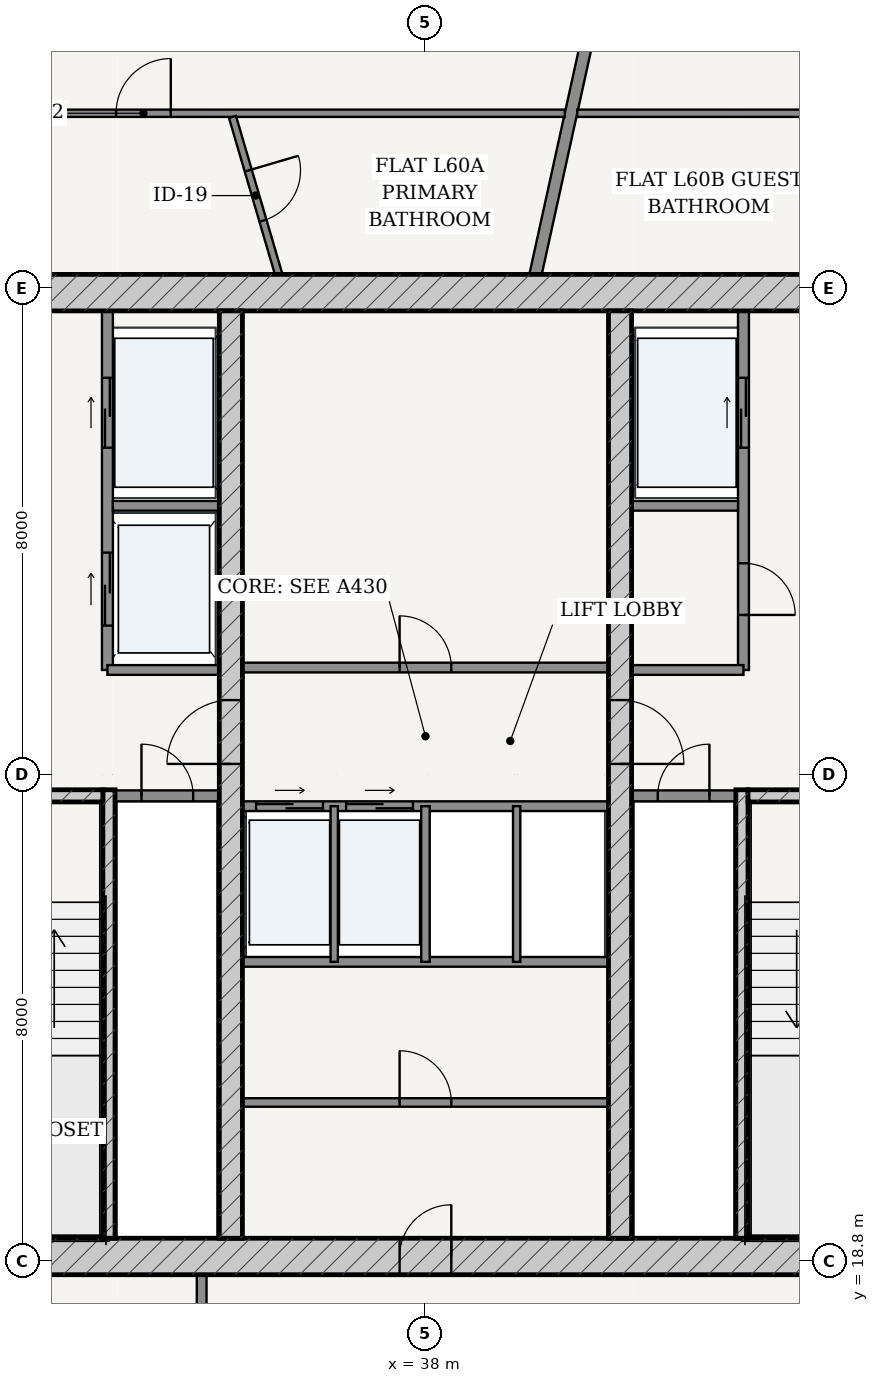
"""IFC4 building model, lengths in metres.
Left out: names, types, materials, properties, quantities, classifications, styles, units other than length and angle.
Written with IfcOpenShell. Run it as: python <this file> out.ifc"""

import sys

from ifc_helpers import new_model, si_unit, direction, frame, frame_2d, origin, place, context, subcontext, project, spatial, rectangle, extrude, source, transform, mapped, element, fill, save


model = new_model("IFC4")
c1 = context("Model", 3, precision=1e-05, world=origin(), true_north=direction((-0.2419218956, 0.970295726276)))
c2 = subcontext(c1, "Body", "Model", "MODEL_VIEW")
j1 = project(units=[si_unit("LENGTHUNIT", "METRE"), si_unit("PLANEANGLEUNIT", "RADIAN")], contexts=[c1])
p1 = place(None, origin())
s1 = spatial("IfcSite", under=j1, at=p1, CompositionType="ELEMENT")
p2 = place(p1, origin())
s2 = spatial("IfcBuilding", under=s1, at=p2, CompositionType="ELEMENT")
p3 = place(p2, frame((0.0, 0.0, 228.2)))
s3 = spatial("IfcBuildingStorey", under=s2, at=p3, CompositionType="ELEMENT", Elevation=228.2)
p4 = place(p3, frame((28.775, 18.875, 0.0), z_axis=(0.0, 0.0, 1.0), x_axis=(1.0, 0.0, 0.0)))
e1 = element("IfcWall", 1, at=p4, inside=s3, PredefinedType="SHEAR", context=c2, shape_type="SweptSolid", body=[
    extrude(rectangle(XDim=18.45, YDim=0.6, at=frame_2d((9.225, 0.0))), origin(), (0.0, 0.0, 1.0), 3.435),
])
p5 = place(p4, frame((8.8, 0.0, 0.0)))
e2 = element("IfcOpeningElement", 2, at=p5, cuts=e1, PredefinedType="OPENING", context=c2, shape_type="SweptSolid", body=[
    extrude(rectangle(XDim=0.85, YDim=2.1, at=frame_2d((0.425, 1.05))), frame((0.0, 0.31, 0.0), z_axis=(0.0, -1.0, 0.0), x_axis=(1.0, 0.0, 0.0)), (0.0, 0.0, 1.0), 0.62),
])
p6 = place(p3, frame((28.775, 34.725, 0.0), z_axis=(0.0, 0.0, 1.0), x_axis=(1.0, 0.0, 0.0)))
e3 = element("IfcWall", 3, at=p6, inside=s3, PredefinedType="SHEAR", context=c2, shape_type="SweptSolid", body=[
    extrude(rectangle(XDim=18.45, YDim=0.6, at=frame_2d((9.225, 0.0))), origin(), (0.0, 0.0, 1.0), 3.435),
])
p7 = place(p3, frame((32.795, 19.175, 0.0), z_axis=(0.0, 0.0, 1.0), x_axis=(0.0, 1.0, 0.0)))
e4 = element("IfcWall", 4, at=p7, inside=s3, PredefinedType="SOLIDWALL", context=c2, shape_type="SweptSolid", body=[
    extrude(rectangle(XDim=7.375, YDim=0.2, at=frame_2d((3.688, 0.0))), origin(), (0.0, 0.0, 1.0), 3.435),
])
p8 = place(p3, frame((29.375, 26.45, 0.0), z_axis=(0.0, 0.0, 1.0), x_axis=(1.0, 0.0, 0.0)))
e5 = element("IfcWall", 5, at=p8, inside=s3, PredefinedType="SOLIDWALL", context=c2, shape_type="SweptSolid", body=[
    extrude(rectangle(XDim=3.32, YDim=0.2, at=frame_2d((1.66, 0.0))), origin(), (0.0, 0.0, 1.0), 3.435),
])
p9 = place(p8, frame((1.185, 0.0, 0.0)))
e6 = element("IfcOpeningElement", 6, at=p9, cuts=e5, PredefinedType="OPENING", context=c2, shape_type="SweptSolid", body=[
    extrude(rectangle(XDim=0.95, YDim=2.15, at=frame_2d((0.475, 1.075))), frame((0.0, 0.11, 0.0), z_axis=(0.0, -1.0, 0.0), x_axis=(1.0, 0.0, 0.0)), (0.0, 0.0, 1.0), 0.22),
])
p10 = place(p3, frame((43.205, 19.175, 0.0), z_axis=(0.0, 0.0, 1.0), x_axis=(0.0, 1.0, 0.0)))
e7 = element("IfcWall", 7, at=p10, inside=s3, PredefinedType="SOLIDWALL", context=c2, shape_type="SweptSolid", body=[
    extrude(rectangle(XDim=7.375, YDim=0.2, at=frame_2d((3.688, 0.0))), origin(), (0.0, 0.0, 1.0), 3.435),
])
p11 = place(p3, frame((43.305, 26.45, 0.0), z_axis=(0.0, 0.0, 1.0), x_axis=(1.0, 0.0, 0.0)))
e8 = element("IfcWall", 8, at=p11, inside=s3, PredefinedType="SOLIDWALL", context=c2, shape_type="SweptSolid", body=[
    extrude(rectangle(XDim=3.32, YDim=0.2, at=frame_2d((1.66, 0.0))), origin(), (0.0, 0.0, 1.0), 3.435),
])
p12 = place(p11, frame((1.185, 0.0, 0.0)))
e9 = element("IfcOpeningElement", 9, at=p12, cuts=e8, PredefinedType="OPENING", context=c2, shape_type="SweptSolid", body=[
    extrude(rectangle(XDim=0.95, YDim=2.15, at=frame_2d((0.475, 1.075))), frame((0.0, 0.11, 0.0), z_axis=(0.0, -1.0, 0.0), x_axis=(1.0, 0.0, 0.0)), (0.0, 0.0, 1.0), 0.22),
])
p13 = place(p3, frame((34.8, 19.175, 0.0), z_axis=(0.0, 0.0, 1.0), x_axis=(0.0, 1.0, 0.0)))
e10 = element("IfcWall", 10, at=p13, inside=s3, PredefinedType="SHEAR", context=c2, shape_type="SweptSolid", body=[
    extrude(rectangle(XDim=15.25, YDim=0.38, at=frame_2d((7.625, 0.0))), origin(), (0.0, 0.0, 1.0), 3.435),
])
p14 = place(p13, frame((7.8, 0.0, 0.0)))
e11 = element("IfcOpeningElement", 11, at=p14, cuts=e10, PredefinedType="OPENING", context=c2, shape_type="SweptSolid", body=[
    extrude(rectangle(XDim=1.05, YDim=2.15, at=frame_2d((0.525, 1.075))), frame((0.0, 0.2, 0.0), z_axis=(0.0, -1.0, 0.0), x_axis=(1.0, 0.0, 0.0)), (0.0, 0.0, 1.0), 0.4),
])
p15 = place(p3, frame((41.2, 19.175, 0.0), z_axis=(0.0, 0.0, 1.0), x_axis=(0.0, 1.0, 0.0)))
e12 = element("IfcWall", 12, at=p15, inside=s3, PredefinedType="SHEAR", context=c2, shape_type="SweptSolid", body=[
    extrude(rectangle(XDim=15.25, YDim=0.38, at=frame_2d((7.625, 0.0))), origin(), (0.0, 0.0, 1.0), 3.435),
])
p16 = place(p15, frame((7.8, 0.0, 0.0)))
e13 = element("IfcOpeningElement", 13, at=p16, cuts=e12, PredefinedType="OPENING", context=c2, shape_type="SweptSolid", body=[
    extrude(rectangle(XDim=1.05, YDim=2.15, at=frame_2d((0.525, 1.075))), frame((0.0, 0.2, 0.0), z_axis=(0.0, -1.0, 0.0), x_axis=(1.0, 0.0, 0.0)), (0.0, 0.0, 1.0), 0.4),
])
p17 = place(p3, frame((32.9, 26.45, 0.0), z_axis=(0.0, 0.0, 1.0), x_axis=(1.0, 0.0, 0.0)))
e14 = element("IfcWall", 14, at=p17, inside=s3, PredefinedType="PARTITIONING", context=c2, shape_type="SweptSolid", body=[
    extrude(rectangle(XDim=1.71, YDim=0.18, at=frame_2d((0.855, 0.0))), origin(), (0.0, 0.0, 1.0), 3.435),
])
p18 = place(p17, frame((0.43, 0.0, 0.0)))
e15 = element("IfcOpeningElement", 15, at=p18, cuts=e14, PredefinedType="OPENING", context=c2, shape_type="SweptSolid", body=[
    extrude(rectangle(XDim=0.85, YDim=2.1, at=frame_2d((0.425, 1.05))), frame((0.0, 0.1, 0.0), z_axis=(0.0, -1.0, 0.0), x_axis=(1.0, 0.0, 0.0)), (0.0, 0.0, 1.0), 0.2),
])
p19 = place(p3, frame((41.39, 26.45, 0.0), z_axis=(0.0, 0.0, 1.0), x_axis=(1.0, 0.0, 0.0)))
e16 = element("IfcWall", 16, at=p19, inside=s3, PredefinedType="PARTITIONING", context=c2, shape_type="SweptSolid", body=[
    extrude(rectangle(XDim=1.71, YDim=0.18, at=frame_2d((0.855, 0.0))), origin(), (0.0, 0.0, 1.0), 3.435),
])
p20 = place(p19, frame((0.43, 0.0, 0.0)))
e17 = element("IfcOpeningElement", 17, at=p20, cuts=e16, PredefinedType="OPENING", context=c2, shape_type="SweptSolid", body=[
    extrude(rectangle(XDim=0.85, YDim=2.1, at=frame_2d((0.425, 1.05))), frame((0.0, 0.1, 0.0), z_axis=(0.0, -1.0, 0.0), x_axis=(1.0, 0.0, 0.0)), (0.0, 0.0, 1.0), 0.2),
])
p21 = place(p3, frame((32.77, 28.52, 0.0), z_axis=(0.0, 0.0, 1.0), x_axis=(0.0, 1.0, 0.0)))
e18 = element("IfcWall", 18, at=p21, inside=s3, PredefinedType="PARTITIONING", context=c2, shape_type="SweptSolid", body=[
    extrude(rectangle(XDim=5.905, YDim=0.18, at=frame_2d((2.953, 0.0))), origin(), (0.0, 0.0, 1.0), 3.435),
])
p22 = place(p21, frame((3.655, 0.0, 0.0)))
e19 = element("IfcOpeningElement", 19, at=p22, cuts=e18, PredefinedType="OPENING", context=c2, shape_type="SweptSolid", body=[
    extrude(rectangle(XDim=1.15, YDim=2.2, at=frame_2d((0.575, 1.1))), frame((0.0, 0.1, 0.0), z_axis=(0.0, -1.0, 0.0), x_axis=(1.0, 0.0, 0.0)), (0.0, 0.0, 1.0), 0.2),
])
p23 = place(p21, frame((0.73, 0.0, 0.0)))
e20 = element("IfcOpeningElement", 20, at=p23, cuts=e18, PredefinedType="OPENING", context=c2, shape_type="SweptSolid", body=[
    extrude(rectangle(XDim=1.2, YDim=2.25, at=frame_2d((0.6, 1.125))), frame((0.0, 0.1, 0.0), z_axis=(0.0, -1.0, 0.0), x_axis=(1.0, 0.0, 0.0)), (0.0, 0.0, 1.0), 0.2),
])
p24 = place(p3, frame((32.86, 31.22, 0.0), z_axis=(0.0, 0.0, 1.0), x_axis=(1.0, 0.0, 0.0)))
e21 = element("IfcWall", 21, at=p24, inside=s3, PredefinedType="PARTITIONING", context=c2, shape_type="SweptSolid", body=[
    extrude(rectangle(XDim=1.75, YDim=0.16, at=frame_2d((0.875, 0.0))), origin(), (0.0, 0.0, 1.0), 3.435),
])
p25 = place(p3, frame((32.77, 28.52, 0.0), z_axis=(0.0, 0.0, 1.0), x_axis=(1.0, 0.0, 0.0)))
e22 = element("IfcWall", 22, at=p25, inside=s3, PredefinedType="PARTITIONING", context=c2, shape_type="SweptSolid", body=[
    extrude(rectangle(XDim=1.84, YDim=0.16, at=frame_2d((0.92, 0.0))), origin(), (0.0, 0.0, 1.0), 3.435),
])
p26 = place(p3, frame((43.23, 28.52, 0.0), z_axis=(0.0, 0.0, 1.0), x_axis=(0.0, 1.0, 0.0)))
e23 = element("IfcWall", 23, at=p26, inside=s3, PredefinedType="PARTITIONING", context=c2, shape_type="SweptSolid", body=[
    extrude(rectangle(XDim=5.905, YDim=0.18, at=frame_2d((2.953, 0.0))), origin(), (0.0, 0.0, 1.0), 3.435),
])
p27 = place(p26, frame((0.905, 0.0, 0.0)))
e24 = element("IfcOpeningElement", 24, at=p27, cuts=e23, PredefinedType="OPENING", context=c2, shape_type="SweptSolid", body=[
    extrude(rectangle(XDim=0.85, YDim=2.1, at=frame_2d((0.425, 1.05))), frame((0.0, 0.1, 0.0), z_axis=(0.0, -1.0, 0.0), x_axis=(1.0, 0.0, 0.0)), (0.0, 0.0, 1.0), 0.2),
])
p28 = place(p26, frame((3.655, 0.0, 0.0)))
e25 = element("IfcOpeningElement", 25, at=p28, cuts=e23, PredefinedType="OPENING", context=c2, shape_type="SweptSolid", body=[
    extrude(rectangle(XDim=1.15, YDim=2.2, at=frame_2d((0.575, 1.1))), frame((0.0, 0.1, 0.0), z_axis=(0.0, -1.0, 0.0), x_axis=(1.0, 0.0, 0.0)), (0.0, 0.0, 1.0), 0.2),
])
p29 = place(p3, frame((41.39, 31.22, 0.0), z_axis=(0.0, 0.0, 1.0), x_axis=(1.0, 0.0, 0.0)))
e26 = element("IfcWall", 26, at=p29, inside=s3, PredefinedType="PARTITIONING", context=c2, shape_type="SweptSolid", body=[
    extrude(rectangle(XDim=1.75, YDim=0.16, at=frame_2d((0.875, 0.0))), origin(), (0.0, 0.0, 1.0), 3.435),
])
p30 = place(p3, frame((41.39, 28.52, 0.0), z_axis=(0.0, 0.0, 1.0), x_axis=(1.0, 0.0, 0.0)))
e27 = element("IfcWall", 27, at=p30, inside=s3, PredefinedType="PARTITIONING", context=c2, shape_type="SweptSolid", body=[
    extrude(rectangle(XDim=1.84, YDim=0.16, at=frame_2d((0.92, 0.0))), origin(), (0.0, 0.0, 1.0), 3.435),
])
p31 = place(p3, frame((34.99, 28.56, 0.0), z_axis=(0.0, 0.0, 1.0), x_axis=(1.0, 0.0, 0.0)))
e28 = element("IfcWall", 28, at=p31, inside=s3, PredefinedType="PARTITIONING", context=c2, shape_type="SweptSolid", body=[
    extrude(rectangle(XDim=6.02, YDim=0.16, at=frame_2d((3.01, 0.0))), origin(), (0.0, 0.0, 1.0), 3.435),
])
p32 = place(p31, frame((2.585, 0.0, 0.0)))
e29 = element("IfcOpeningElement", 29, at=p32, cuts=e28, PredefinedType="OPENING", context=c2, shape_type="SweptSolid", body=[
    extrude(rectangle(XDim=0.85, YDim=2.1, at=frame_2d((0.425, 1.05))), frame((0.0, 0.09, 0.0), z_axis=(0.0, -1.0, 0.0), x_axis=(1.0, 0.0, 0.0)), (0.0, 0.0, 1.0), 0.18),
])
p33 = place(p3, frame((34.99, 26.28, 0.0), z_axis=(0.0, 0.0, 1.0), x_axis=(1.0, 0.0, 0.0)))
e30 = element("IfcWall", 30, at=p33, inside=s3, PredefinedType="PARTITIONING", context=c2, shape_type="SweptSolid", body=[
    extrude(rectangle(XDim=6.02, YDim=0.16, at=frame_2d((3.01, 0.0))), origin(), (0.0, 0.0, 1.0), 3.435),
])
p34 = place(p33, frame((0.225, 0.0, 0.0)))
e31 = element("IfcOpeningElement", 31, at=p34, cuts=e30, PredefinedType="OPENING", context=c2, shape_type="SweptSolid", body=[
    extrude(rectangle(XDim=1.1, YDim=2.2, at=frame_2d((0.55, 1.1))), frame((0.0, 0.09, 0.0), z_axis=(0.0, -1.0, 0.0), x_axis=(1.0, 0.0, 0.0)), (0.0, 0.0, 1.0), 0.18),
])
p35 = place(p33, frame((1.705, 0.0, 0.0)))
e32 = element("IfcOpeningElement", 32, at=p35, cuts=e30, PredefinedType="OPENING", context=c2, shape_type="SweptSolid", body=[
    extrude(rectangle(XDim=1.1, YDim=2.2, at=frame_2d((0.55, 1.1))), frame((0.0, 0.09, 0.0), z_axis=(0.0, -1.0, 0.0), x_axis=(1.0, 0.0, 0.0)), (0.0, 0.0, 1.0), 0.18),
])
p36 = place(p3, frame((34.99, 23.72, 0.0), z_axis=(0.0, 0.0, 1.0), x_axis=(1.0, 0.0, 0.0)))
e33 = element("IfcWall", 33, at=p36, inside=s3, PredefinedType="PARTITIONING", context=c2, shape_type="SweptSolid", body=[
    extrude(rectangle(XDim=6.02, YDim=0.16, at=frame_2d((3.01, 0.0))), origin(), (0.0, 0.0, 1.0), 3.435),
])
p37 = place(p3, frame((36.5, 23.72, 0.0), z_axis=(0.0, 0.0, 1.0), x_axis=(0.0, 1.0, 0.0)))
e34 = element("IfcWall", 34, at=p37, inside=s3, PredefinedType="PARTITIONING", context=c2, shape_type="SweptSolid", body=[
    extrude(rectangle(XDim=2.56, YDim=0.12, at=frame_2d((1.28, 0.0))), origin(), (0.0, 0.0, 1.0), 3.435),
])
p38 = place(p3, frame((38.0, 23.72, 0.0), z_axis=(0.0, 0.0, 1.0), x_axis=(0.0, 1.0, 0.0)))
e35 = element("IfcWall", 35, at=p38, inside=s3, PredefinedType="PARTITIONING", context=c2, shape_type="SweptSolid", body=[
    extrude(rectangle(XDim=2.56, YDim=0.14, at=frame_2d((1.28, 0.0))), origin(), (0.0, 0.0, 1.0), 3.435),
])
p39 = place(p3, frame((39.5, 23.72, 0.0), z_axis=(0.0, 0.0, 1.0), x_axis=(0.0, 1.0, 0.0)))
e36 = element("IfcWall", 36, at=p39, inside=s3, PredefinedType="PARTITIONING", context=c2, shape_type="SweptSolid", body=[
    extrude(rectangle(XDim=2.56, YDim=0.12, at=frame_2d((1.28, 0.0))), origin(), (0.0, 0.0, 1.0), 3.435),
])
p40 = place(p3, frame((34.99, 21.407, 0.0), z_axis=(0.0, 0.0, 1.0), x_axis=(1.0, 0.0, 0.0)))
e37 = element("IfcWall", 37, at=p40, inside=s3, PredefinedType="PARTITIONING", context=c2, shape_type="SweptSolid", body=[
    extrude(rectangle(XDim=6.02, YDim=0.14, at=frame_2d((3.01, 0.0))), origin(), (0.0, 0.0, 1.0), 3.435),
])
p41 = place(p40, frame((2.585, 0.0, 0.0)))
e38 = element("IfcOpeningElement", 38, at=p41, cuts=e37, PredefinedType="OPENING", context=c2, shape_type="SweptSolid", body=[
    extrude(rectangle(XDim=0.85, YDim=2.1, at=frame_2d((0.425, 1.05))), frame((0.0, 0.08, 0.0), z_axis=(0.0, -1.0, 0.0), x_axis=(1.0, 0.0, 0.0)), (0.0, 0.0, 1.0), 0.16),
])
p42 = place(p3, frame((34.32, 16.725, 0.0), z_axis=(0.0, 0.0, 1.0), x_axis=(0.0, 1.0, 0.0)))
e39 = element("IfcWall", 39, at=p42, inside=s3, PredefinedType="PARTITIONING", context=c2, shape_type="SweptSolid", body=[
    extrude(rectangle(XDim=1.85, YDim=0.16, at=frame_2d((0.925, 0.0))), origin(), (0.0, 0.0, 1.0), 3.435),
])
p43 = place(p3, frame((39.811, 35.027, 0.0), z_axis=(0.0, 0.0, 1.0), x_axis=(0.214966857327, 0.976621344356, 0.0)))
e40 = element("IfcWall", 40, at=p43, inside=s3, PredefinedType="PARTITIONING", context=c2, shape_type="SweptSolid", body=[
    extrude(rectangle(XDim=11.258, YDim=0.2, at=frame_2d((5.629, 0.0))), origin(), (0.0, 0.0, 1.0), 2.52),
])
p44 = place(p3, frame((31.585, 37.675, 0.0), z_axis=(0.0, 0.0, 1.0), x_axis=(1.0, 0.0, 0.0)))
e41 = element("IfcWall", 41, at=p44, inside=s3, PredefinedType="PARTITIONING", context=c2, shape_type="SweptSolid", body=[
    extrude(rectangle(XDim=8.707, YDim=0.12, at=frame_2d((4.354, 0.0))), origin(), (0.0, 0.0, 1.0), 2.951),
])
p45 = place(p44, frame((1.327, 0.0, 0.0)))
e42 = element("IfcOpeningElement", 42, at=p45, cuts=e41, PredefinedType="OPENING", context=c2, shape_type="SweptSolid", body=[
    extrude(rectangle(XDim=0.9, YDim=2.15, at=frame_2d((0.45, 1.075))), frame((0.0, 0.07, 0.0), z_axis=(0.0, -1.0, 0.0), x_axis=(1.0, 0.0, 0.0)), (0.0, 0.0, 1.0), 0.14),
])
p46 = place(p3, frame((35.586, 35.027, 0.0), z_axis=(0.0, 0.0, 1.0), x_axis=(-0.281539118681, 0.959549751004, 0.0)))
e43 = element("IfcWall", 43, at=p46, inside=s3, PredefinedType="PARTITIONING", context=c2, shape_type="SweptSolid", body=[
    extrude(rectangle(XDim=2.698, YDim=0.12, at=frame_2d((1.349, 0.0))), origin(), (0.0, 0.0, 1.0), 2.52),
])
p47 = place(p46, frame((0.919, 0.0, 0.0)))
e44 = element("IfcOpeningElement", 44, at=p47, cuts=e43, PredefinedType="OPENING", context=c2, shape_type="SweptSolid", body=[
    extrude(rectangle(XDim=0.86, YDim=2.15, at=frame_2d((0.43, 1.075))), frame((0.0, 0.07, 0.0), z_axis=(0.0, -1.0, 0.0), x_axis=(1.0, 0.0, 0.0)), (0.0, 0.0, 1.0), 0.14),
])
p48 = place(p3, frame((40.496, 37.675, 0.0), z_axis=(0.0, 0.0, 1.0), x_axis=(1.0, 0.0, 0.0)))
e45 = element("IfcWall", 45, at=p48, inside=s3, PredefinedType="PARTITIONING", context=c2, shape_type="SweptSolid", body=[
    extrude(rectangle(XDim=3.919, YDim=0.12, at=frame_2d((1.959, 0.0))), origin(), (0.0, 0.0, 1.0), 2.951),
])
m1 = source(origin(), c2, "Body", "SweptSolid", [
    extrude(rectangle(XDim=1.05, YDim=2.15, at=frame_2d((0.525, 1.075))), frame((0.0, 0.025, 0.0), z_axis=(0.0, -1.0, 0.0), x_axis=(1.0, 0.0, 0.0)), (0.0, 0.0, 1.0), 0.05),
])
p49 = place(p14, origin())
e46 = element("IfcDoor", 46, at=p49, inside=s3, OperationType="SINGLE_SWING_LEFT", PredefinedType="DOOR", context=c2, shape_type="MappedRepresentation", body=[
    mapped(m1, transform((0.0, 0.0, 0.0), scale=1.0)),
])
fill(e11, e46)
p50 = place(p16, frame((1.05, 0.0, 0.0), z_axis=(0.0, 0.0, 1.0), x_axis=(-1.0, 0.0, 0.0)))
e47 = element("IfcDoor", 47, at=p50, inside=s3, OperationType="SINGLE_SWING_RIGHT", PredefinedType="DOOR", context=c2, shape_type="MappedRepresentation", body=[
    mapped(m1, transform((0.0, 0.0, 0.0), scale=1.0)),
])
fill(e13, e47)
m2 = source(origin(), c2, "Body", "SweptSolid", [
    extrude(rectangle(XDim=0.85, YDim=2.1, at=frame_2d((0.425, 1.05))), frame((0.0, 0.025, 0.0), z_axis=(0.0, -1.0, 0.0), x_axis=(1.0, 0.0, 0.0)), (0.0, 0.0, 1.0), 0.05),
])
p51 = place(p18, origin())
e48 = element("IfcDoor", 48, at=p51, inside=s3, OperationType="SINGLE_SWING_LEFT", PredefinedType="DOOR", context=c2, shape_type="MappedRepresentation", body=[
    mapped(m2, transform((0.0, 0.0, 0.0), scale=1.0)),
])
fill(e15, e48)
p52 = place(p20, origin())
e49 = element("IfcDoor", 49, at=p52, inside=s3, OperationType="SINGLE_SWING_RIGHT", PredefinedType="DOOR", context=c2, shape_type="MappedRepresentation", body=[
    mapped(m2, transform((0.0, 0.0, 0.0), scale=1.0)),
])
fill(e17, e49)
p53 = place(p27, frame((0.85, 0.0, 0.0), z_axis=(0.0, 0.0, 1.0), x_axis=(-1.0, 0.0, 0.0)))
e50 = element("IfcDoor", 50, at=p53, inside=s3, OperationType="SINGLE_SWING_RIGHT", PredefinedType="DOOR", context=c2, shape_type="MappedRepresentation", body=[
    mapped(m2, transform((0.0, 0.0, 0.0), scale=1.0)),
])
fill(e24, e50)
p54 = place(p32, origin())
e51 = element("IfcDoor", 51, at=p54, inside=s3, OperationType="SINGLE_SWING_LEFT", PredefinedType="DOOR", context=c2, shape_type="MappedRepresentation", body=[
    mapped(m2, transform((0.0, 0.0, 0.0), scale=1.0)),
])
fill(e29, e51)
p55 = place(p5, origin())
e52 = element("IfcDoor", 52, at=p55, inside=s3, OperationType="SINGLE_SWING_RIGHT", PredefinedType="DOOR", context=c2, shape_type="MappedRepresentation", body=[
    mapped(m2, transform((0.0, 0.0, 0.0), scale=1.0)),
])
fill(e2, e52)
p56 = place(p41, origin())
e53 = element("IfcDoor", 53, at=p56, inside=s3, OperationType="SINGLE_SWING_LEFT", PredefinedType="DOOR", context=c2, shape_type="MappedRepresentation", body=[
    mapped(m2, transform((0.0, 0.0, 0.0), scale=1.0)),
])
fill(e38, e53)
m3 = source(origin(), c2, "Body", "SweptSolid", [
    extrude(rectangle(XDim=1.15, YDim=2.2, at=frame_2d((0.575, 1.1))), frame((0.0, 0.025, 0.0), z_axis=(0.0, -1.0, 0.0), x_axis=(1.0, 0.0, 0.0)), (0.0, 0.0, 1.0), 0.05),
])
p57 = place(p22, origin())
e54 = element("IfcDoor", 54, at=p57, inside=s3, OperationType="DOUBLE_DOOR_SLIDING", PredefinedType="DOOR", context=c2, shape_type="MappedRepresentation", body=[
    mapped(m3, transform((0.0, 0.0, 0.0), scale=1.0)),
])
fill(e19, e54)
p58 = place(p28, origin())
e55 = element("IfcDoor", 55, at=p58, inside=s3, OperationType="DOUBLE_DOOR_SLIDING", PredefinedType="DOOR", context=c2, shape_type="MappedRepresentation", body=[
    mapped(m3, transform((0.0, 0.0, 0.0), scale=1.0)),
])
fill(e25, e55)
m4 = source(origin(), c2, "Body", "SweptSolid", [
    extrude(rectangle(XDim=1.2, YDim=2.25, at=frame_2d((0.6, 1.125))), frame((0.0, 0.025, 0.0), z_axis=(0.0, -1.0, 0.0), x_axis=(1.0, 0.0, 0.0)), (0.0, 0.0, 1.0), 0.05),
])
p59 = place(p23, origin())
e56 = element("IfcDoor", 56, at=p59, inside=s3, OperationType="DOUBLE_DOOR_SLIDING", PredefinedType="DOOR", context=c2, shape_type="MappedRepresentation", body=[
    mapped(m4, transform((0.0, 0.0, 0.0), scale=1.0)),
])
fill(e20, e56)
m5 = source(origin(), c2, "Body", "SweptSolid", [
    extrude(rectangle(XDim=1.1, YDim=2.2, at=frame_2d((0.55, 1.1))), frame((0.0, 0.025, 0.0), z_axis=(0.0, -1.0, 0.0), x_axis=(1.0, 0.0, 0.0)), (0.0, 0.0, 1.0), 0.05),
])
p60 = place(p34, origin())
e57 = element("IfcDoor", 57, at=p60, inside=s3, OperationType="DOUBLE_DOOR_SLIDING", PredefinedType="DOOR", context=c2, shape_type="MappedRepresentation", body=[
    mapped(m5, transform((0.0, 0.0, 0.0), scale=1.0)),
])
fill(e31, e57)
p61 = place(p35, origin())
e58 = element("IfcDoor", 58, at=p61, inside=s3, OperationType="DOUBLE_DOOR_SLIDING", PredefinedType="DOOR", context=c2, shape_type="MappedRepresentation", body=[
    mapped(m5, transform((0.0, 0.0, 0.0), scale=1.0)),
])
fill(e32, e58)
m6 = source(origin(), c2, "Body", "SweptSolid", [
    extrude(rectangle(XDim=0.86, YDim=2.15, at=frame_2d((0.43, 1.075))), frame((0.0, 0.025, 0.0), z_axis=(0.0, -1.0, 0.0), x_axis=(1.0, 0.0, 0.0)), (0.0, 0.0, 1.0), 0.05),
])
p62 = place(p47, frame((0.86, 0.0, 0.0), z_axis=(0.0, 0.0, 1.0), x_axis=(-1.0, 0.0, 0.0)))
e59 = element("IfcDoor", 59, at=p62, inside=s3, OperationType="SINGLE_SWING_LEFT", PredefinedType="DOOR", context=c2, shape_type="MappedRepresentation", body=[
    mapped(m6, transform((0.0, 0.0, 0.0), scale=1.0)),
])
fill(e44, e59)
m7 = source(origin(), c2, "Body", "SweptSolid", [
    extrude(rectangle(XDim=0.9, YDim=2.15, at=frame_2d((0.45, 1.075))), frame((0.0, 0.025, 0.0), z_axis=(0.0, -1.0, 0.0), x_axis=(1.0, 0.0, 0.0)), (0.0, 0.0, 1.0), 0.05),
])
p63 = place(p45, origin())
e60 = element("IfcDoor", 60, at=p63, inside=s3, OperationType="SINGLE_SWING_RIGHT", PredefinedType="DOOR", context=c2, shape_type="MappedRepresentation", body=[
    mapped(m7, transform((0.0, 0.0, 0.0), scale=1.0)),
])
fill(e42, e60)
save(model, sys.argv[1])
